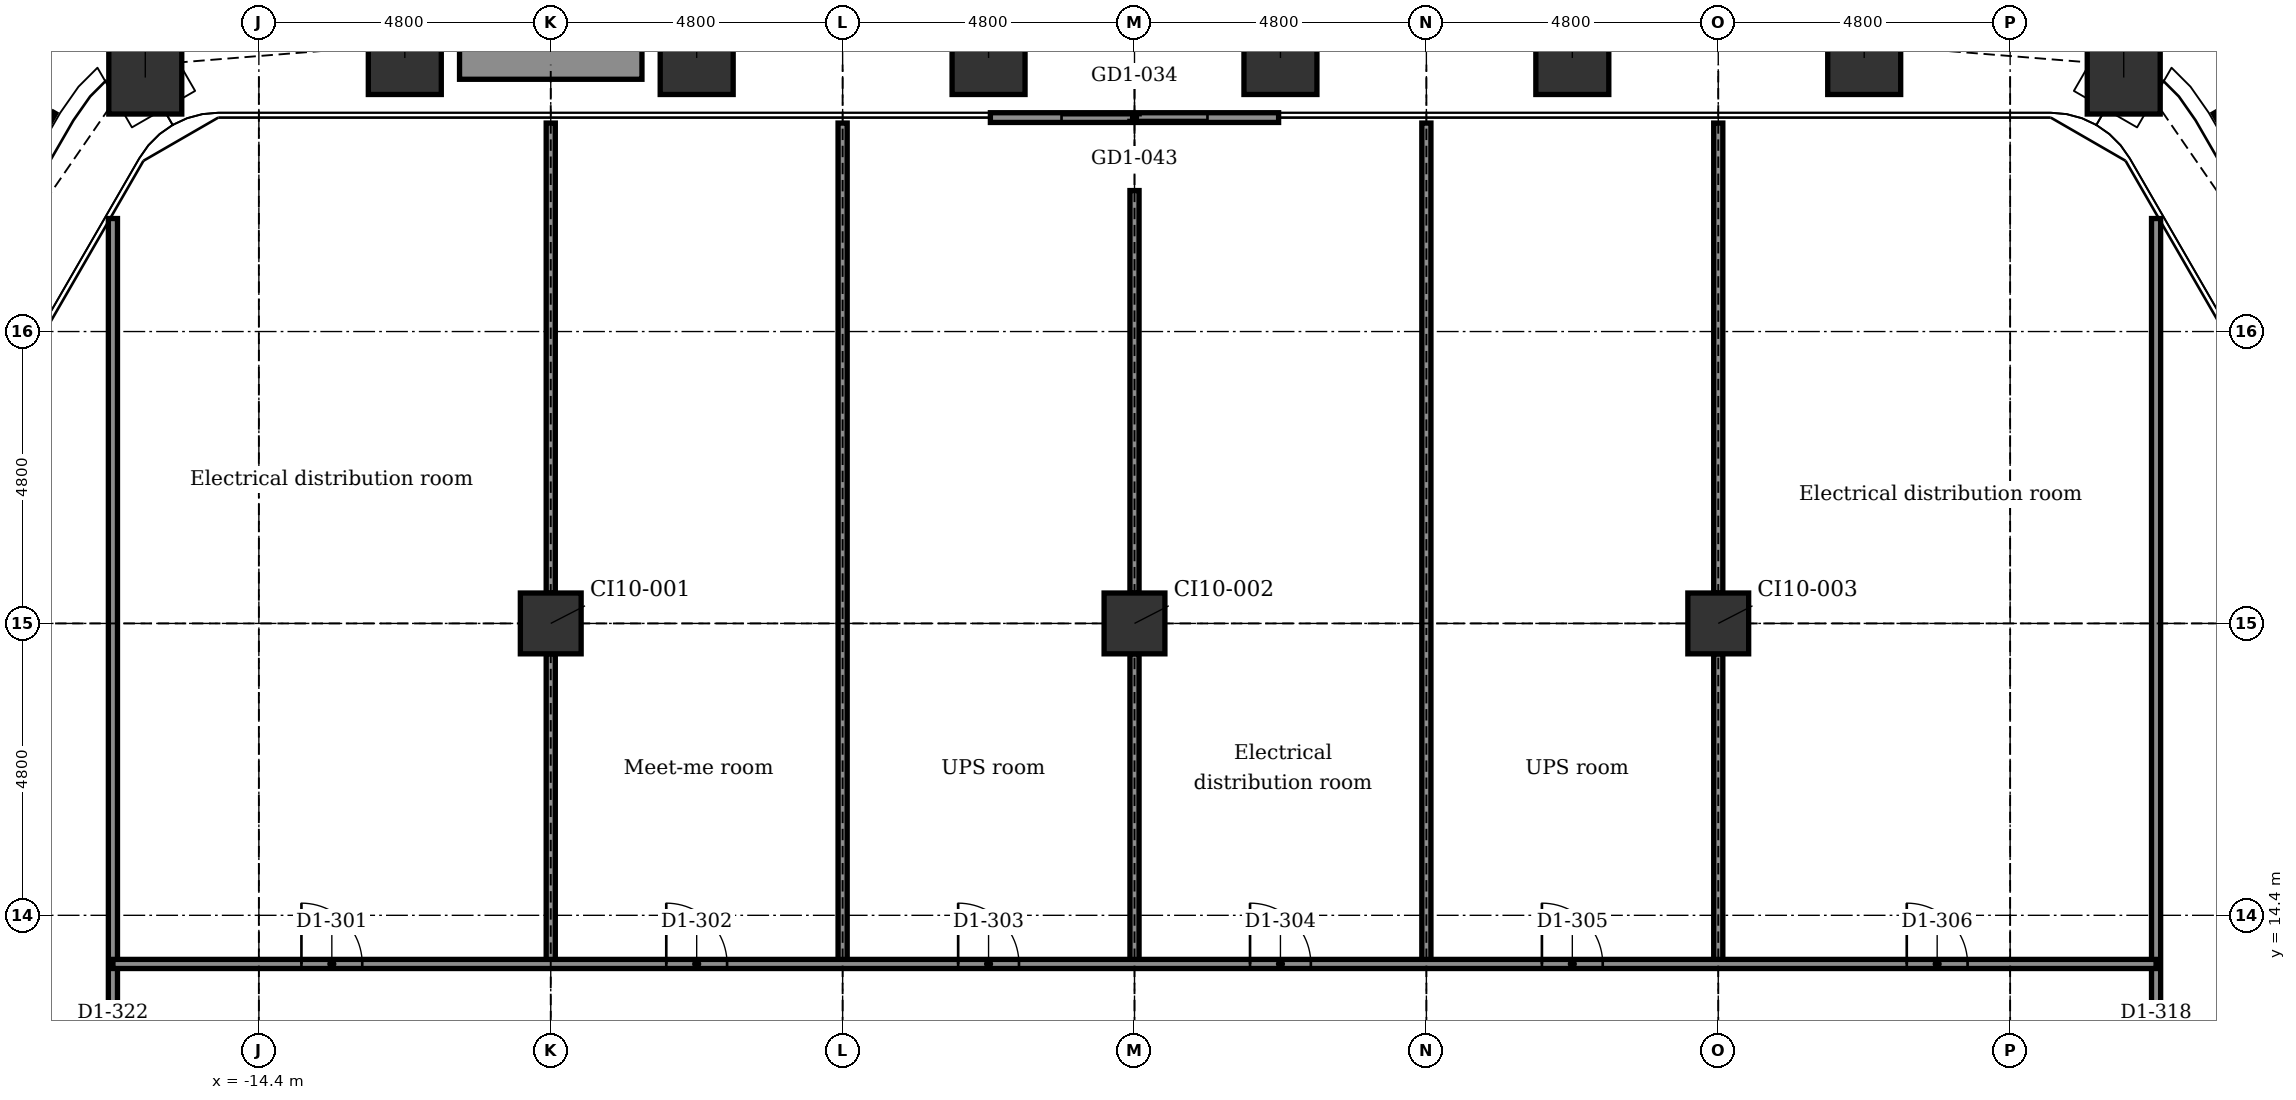
"""IFC4 building model, lengths in metres.
Left out: names, types, materials, properties, quantities, classifications, styles, units other than length and angle.
Written with IfcOpenShell. Run it as: python <this file> out.ifc"""

import sys

from ifc_helpers import new_model, si_unit, direction, frame, frame_2d, origin, origin_2d, place, context, subcontext, project, spatial, rectangle, extrude, element, fill, save


model = new_model("IFC4")
c1 = context("Model", 3, precision=1e-05, world=origin(), true_north=direction((0.0, 1.0)))
c2 = subcontext(c1, "Body", "Model", "MODEL_VIEW")
j1 = project(units=[si_unit("LENGTHUNIT", "METRE"), si_unit("PLANEANGLEUNIT", "RADIAN")], contexts=[c1])
p1 = place(None, origin())
s1 = spatial("IfcSite", under=j1, at=p1, CompositionType="ELEMENT")
p2 = place(p1, origin())
s2 = spatial("IfcBuilding", under=s1, at=p2, CompositionType="ELEMENT")
p3 = place(p2, frame((0.0, 0.0, 113.9)))
s3 = spatial("IfcBuildingStorey", under=s2, at=p3, CompositionType="ELEMENT", Elevation=113.9)
for number, where, z_axis, x_axis in (
    (1, (-16.268, 28.177, -0.2), (0.0, 0.0, 1.0), (0.866, 0.5, 0.0)),
    (2, (-12.0, 28.499, -0.2), (0.0, 0.0, 1.0), (1.0, 0.0, 0.0)),
    (3, (-7.2, 28.499, -0.2), (0.0, 0.0, 1.0), (1.0, 0.0, 0.0)),
    (4, (-2.4, 28.499, -0.2), (0.0, 0.0, 1.0), (1.0, 0.0, 0.0)),
    (5, (2.4, 28.499, -0.2), (0.0, 0.0, 1.0), (1.0, 0.0, 0.0)),
    (6, (7.2, 28.499, -0.2), (0.0, 0.0, 1.0), (1.0, 0.0, 0.0)),
    (7, (12.0, 28.499, -0.2), (0.0, 0.0, 1.0), (1.0, 0.0, 0.0)),
    (8, (16.268, 28.177, -0.2), (0.0, 0.0, 1.0), (0.5, 0.866, 0.0)),
):
    element("IfcColumn", number, at=place(p3, frame(where, z_axis=z_axis, x_axis=x_axis)), inside=s3, PredefinedType="COLUMN", context=c2, shape_type="SweptSolid", body=[
        extrude(rectangle(XDim=1.2, YDim=1.2, at=origin_2d()), origin(), (0.0, 0.0, 1.0), 4.5),
    ])
for number, where, z_axis, x_axis in (
    (9, (-9.6, 19.2, -0.2), (0.0, 0.0, 1.0), (1.0, 0.0, 0.0)),
    (10, (0.0, 19.2, -0.2), (0.0, 0.0, 1.0), (1.0, 0.0, 0.0)),
    (11, (9.6, 19.2, -0.2), (0.0, 0.0, 1.0), (1.0, 0.0, 0.0)),
):
    element("IfcColumn", number, at=place(p3, frame(where, z_axis=z_axis, x_axis=x_axis)), inside=s3, PredefinedType="COLUMN", context=c2, shape_type="SweptSolid", body=[
        extrude(rectangle(XDim=1.0, YDim=1.0, at=origin_2d()), origin(), (0.0, 0.0, 1.0), 4.5),
    ])
p4 = place(p3, frame((-2.37, 27.519, 0.0), z_axis=(0.0, 0.0, 1.0), x_axis=(1.0, 0.0, 0.0)))
e12 = element("IfcWall", 12, at=p4, inside=s3, PredefinedType="PARTITIONING", context=c2, shape_type="SweptSolid", body=[
    extrude(rectangle(XDim=4.74, YDim=0.16, at=frame_2d((2.37, 0.0))), origin(), (0.0, 0.0, 1.0), 4.3),
])
p5 = place(p4, frame((1.17, 0.0, 0.0)))
e13 = element("IfcOpeningElement", 13, at=p5, cuts=e12, PredefinedType="OPENING", context=c2, shape_type="SweptSolid", body=[
    extrude(rectangle(XDim=2.4, YDim=2.4, at=frame_2d((1.2, 1.2))), frame((0.0, 0.09, 0.0), z_axis=(0.0, -1.0, 0.0), x_axis=(1.0, 0.0, 0.0)), (0.0, 0.0, 1.0), 0.18),
])
p6 = place(p3, frame((-11.1, 28.448, 0.0), z_axis=(0.0, 0.0, 1.0), x_axis=(1.0, 0.0, 0.0)))
e14 = element("IfcWall", 14, at=p6, inside=s3, PredefinedType="USERDEFINED", context=c2, shape_type="SweptSolid", body=[
    extrude(rectangle(XDim=3.0, YDim=0.6, at=frame_2d((1.5, 0.0))), origin(), (0.0, 0.0, 1.0), 0.7),
])
p7 = place(p3, frame((16.8, 3.95, 0.0), z_axis=(0.0, 0.0, 1.0), x_axis=(0.0, 1.0, 0.0)))
e15 = element("IfcWall", 15, at=p7, inside=s3, PredefinedType="PARTITIONING", context=c2, shape_type="SweptSolid", body=[
    extrude(rectangle(XDim=21.908, YDim=0.15, at=frame_2d((10.954, 0.0))), origin(), (0.0, 0.0, 1.0), 4.3),
])
p8 = place(p7, frame((0.95, 0.0, 0.0)))
e16 = element("IfcOpeningElement", 16, at=p8, cuts=e15, PredefinedType="OPENING", context=c2, shape_type="SweptSolid", body=[
    extrude(rectangle(XDim=1.0, YDim=2.1, at=frame_2d((0.5, 1.05))), frame((0.0, 0.085, 0.0), z_axis=(0.0, -1.0, 0.0), x_axis=(1.0, 0.0, 0.0)), (0.0, 0.0, 1.0), 0.17),
])
p9 = place(p7, frame((3.675, 0.0, 0.0)))
e17 = element("IfcOpeningElement", 17, at=p9, cuts=e15, PredefinedType="OPENING", context=c2, shape_type="SweptSolid", body=[
    extrude(rectangle(XDim=1.0, YDim=2.1, at=frame_2d((0.5, 1.05))), frame((0.0, 0.085, 0.0), z_axis=(0.0, -1.0, 0.0), x_axis=(1.0, 0.0, 0.0)), (0.0, 0.0, 1.0), 0.17),
])
p10 = place(p7, frame((7.35, 0.0, 0.0)))
e18 = element("IfcOpeningElement", 18, at=p10, cuts=e15, PredefinedType="OPENING", context=c2, shape_type="SweptSolid", body=[
    extrude(rectangle(XDim=1.0, YDim=2.1, at=frame_2d((0.5, 1.05))), frame((0.0, 0.085, 0.0), z_axis=(0.0, -1.0, 0.0), x_axis=(1.0, 0.0, 0.0)), (0.0, 0.0, 1.0), 0.17),
])
p11 = place(p3, frame((9.6, 13.6, 0.0), z_axis=(0.0, 0.0, 1.0), x_axis=(0.0, 1.0, 0.0)))
e19 = element("IfcWall", 19, at=p11, inside=s3, PredefinedType="PARTITIONING", context=c2, shape_type="SweptSolid", body=[
    extrude(rectangle(XDim=5.1, YDim=0.15, at=frame_2d((2.55, 0.0))), origin(), (0.0, 0.0, 1.0), 3.843),
])
p12 = place(p3, frame((9.6, 19.7, 0.0), z_axis=(0.0, 0.0, 1.0), x_axis=(0.0, 1.0, 0.0)))
e20 = element("IfcWall", 20, at=p12, inside=s3, PredefinedType="PARTITIONING", context=c2, shape_type="SweptSolid", body=[
    extrude(rectangle(XDim=7.729, YDim=0.15, at=frame_2d((3.864, 0.0))), origin(), (0.0, 0.0, 1.0), 3.843),
])
p13 = place(p3, frame((4.8, 13.6, 0.0), z_axis=(0.0, 0.0, 1.0), x_axis=(0.0, 1.0, 0.0)))
e21 = element("IfcWall", 21, at=p13, inside=s3, PredefinedType="PARTITIONING", context=c2, shape_type="SweptSolid", body=[
    extrude(rectangle(XDim=13.828, YDim=0.15, at=frame_2d((6.914, 0.0))), origin(), (0.0, 0.0, 1.0), 3.843),
])
p14 = place(p3, frame((0.0, 13.6, 0.0), z_axis=(0.0, 0.0, 1.0), x_axis=(0.0, 1.0, 0.0)))
e22 = element("IfcWall", 22, at=p14, inside=s3, PredefinedType="PARTITIONING", context=c2, shape_type="SweptSolid", body=[
    extrude(rectangle(XDim=5.1, YDim=0.15, at=frame_2d((2.55, 0.0))), origin(), (0.0, 0.0, 1.0), 3.843),
])
p15 = place(p3, frame((0.0, 19.7, 0.0), z_axis=(0.0, 0.0, 1.0), x_axis=(0.0, 1.0, 0.0)))
e23 = element("IfcWall", 23, at=p15, inside=s3, PredefinedType="PARTITIONING", context=c2, shape_type="SweptSolid", body=[
    extrude(rectangle(XDim=6.619, YDim=0.15, at=frame_2d((3.309, 0.0))), origin(), (0.0, 0.0, 1.0), 3.843),
])
p16 = place(p3, frame((-4.8, 13.6, 0.0), z_axis=(0.0, 0.0, 1.0), x_axis=(0.0, 1.0, 0.0)))
e24 = element("IfcWall", 24, at=p16, inside=s3, PredefinedType="PARTITIONING", context=c2, shape_type="SweptSolid", body=[
    extrude(rectangle(XDim=13.828, YDim=0.15, at=frame_2d((6.914, 0.0))), origin(), (0.0, 0.0, 1.0), 3.843),
])
p17 = place(p3, frame((-9.6, 13.6, 0.0), z_axis=(0.0, 0.0, 1.0), x_axis=(0.0, 1.0, 0.0)))
e25 = element("IfcWall", 25, at=p17, inside=s3, PredefinedType="PARTITIONING", context=c2, shape_type="SweptSolid", body=[
    extrude(rectangle(XDim=5.1, YDim=0.15, at=frame_2d((2.55, 0.0))), origin(), (0.0, 0.0, 1.0), 3.843),
])
p18 = place(p3, frame((-9.6, 19.7, 0.0), z_axis=(0.0, 0.0, 1.0), x_axis=(0.0, 1.0, 0.0)))
e26 = element("IfcWall", 26, at=p18, inside=s3, PredefinedType="PARTITIONING", context=c2, shape_type="SweptSolid", body=[
    extrude(rectangle(XDim=7.729, YDim=0.15, at=frame_2d((3.864, 0.0))), origin(), (0.0, 0.0, 1.0), 3.843),
])
p19 = place(p3, frame((-16.8, 3.95, 0.0), z_axis=(0.0, 0.0, 1.0), x_axis=(0.0, 1.0, 0.0)))
e27 = element("IfcWall", 27, at=p19, inside=s3, PredefinedType="PARTITIONING", context=c2, shape_type="SweptSolid", body=[
    extrude(rectangle(XDim=21.908, YDim=0.15, at=frame_2d((10.954, 0.0))), origin(), (0.0, 0.0, 1.0), 4.3),
])
p20 = place(p19, frame((1.25, 0.0, 0.0)))
e28 = element("IfcOpeningElement", 28, at=p20, cuts=e27, PredefinedType="OPENING", context=c2, shape_type="SweptSolid", body=[
    extrude(rectangle(XDim=1.0, YDim=2.1, at=frame_2d((0.5, 1.05))), frame((0.0, 0.085, 0.0), z_axis=(0.0, -1.0, 0.0), x_axis=(1.0, 0.0, 0.0)), (0.0, 0.0, 1.0), 0.17),
])
p21 = place(p19, frame((4.15, 0.0, 0.0)))
e29 = element("IfcOpeningElement", 29, at=p21, cuts=e27, PredefinedType="OPENING", context=c2, shape_type="SweptSolid", body=[
    extrude(rectangle(XDim=1.0, YDim=2.1, at=frame_2d((0.5, 1.05))), frame((0.0, 0.085, 0.0), z_axis=(0.0, -1.0, 0.0), x_axis=(1.0, 0.0, 0.0)), (0.0, 0.0, 1.0), 0.17),
])
p22 = place(p19, frame((7.35, 0.0, 0.0)))
e30 = element("IfcOpeningElement", 30, at=p22, cuts=e27, PredefinedType="OPENING", context=c2, shape_type="SweptSolid", body=[
    extrude(rectangle(XDim=1.0, YDim=2.1, at=frame_2d((0.5, 1.05))), frame((0.0, 0.085, 0.0), z_axis=(0.0, -1.0, 0.0), x_axis=(1.0, 0.0, 0.0)), (0.0, 0.0, 1.0), 0.17),
])
p23 = place(p3, frame((-16.8, 13.6, 0.0), z_axis=(0.0, 0.0, 1.0), x_axis=(1.0, 0.0, 0.0)))
e31 = element("IfcWall", 31, at=p23, inside=s3, PredefinedType="PARTITIONING", context=c2, shape_type="SweptSolid", body=[
    extrude(rectangle(XDim=33.6, YDim=0.15, at=frame_2d((16.8, 0.0))), origin(), (0.0, 0.0, 1.0), 4.3),
])
p24 = place(p23, frame((3.1, 0.0, 0.0)))
e32 = element("IfcOpeningElement", 32, at=p24, cuts=e31, PredefinedType="OPENING", context=c2, shape_type="SweptSolid", body=[
    extrude(rectangle(XDim=1.0, YDim=2.1, at=frame_2d((0.5, 1.05))), frame((0.0, 0.085, 0.0), z_axis=(0.0, -1.0, 0.0), x_axis=(1.0, 0.0, 0.0)), (0.0, 0.0, 1.0), 0.17),
])
p25 = place(p23, frame((9.1, 0.0, 0.0)))
e33 = element("IfcOpeningElement", 33, at=p25, cuts=e31, PredefinedType="OPENING", context=c2, shape_type="SweptSolid", body=[
    extrude(rectangle(XDim=1.0, YDim=2.1, at=frame_2d((0.5, 1.05))), frame((0.0, 0.085, 0.0), z_axis=(0.0, -1.0, 0.0), x_axis=(1.0, 0.0, 0.0)), (0.0, 0.0, 1.0), 0.17),
])
p26 = place(p23, frame((13.9, 0.0, 0.0)))
e34 = element("IfcOpeningElement", 34, at=p26, cuts=e31, PredefinedType="OPENING", context=c2, shape_type="SweptSolid", body=[
    extrude(rectangle(XDim=1.0, YDim=2.1, at=frame_2d((0.5, 1.05))), frame((0.0, 0.085, 0.0), z_axis=(0.0, -1.0, 0.0), x_axis=(1.0, 0.0, 0.0)), (0.0, 0.0, 1.0), 0.17),
])
p27 = place(p23, frame((18.7, 0.0, 0.0)))
e35 = element("IfcOpeningElement", 35, at=p27, cuts=e31, PredefinedType="OPENING", context=c2, shape_type="SweptSolid", body=[
    extrude(rectangle(XDim=1.0, YDim=2.1, at=frame_2d((0.5, 1.05))), frame((0.0, 0.085, 0.0), z_axis=(0.0, -1.0, 0.0), x_axis=(1.0, 0.0, 0.0)), (0.0, 0.0, 1.0), 0.17),
])
p28 = place(p23, frame((23.5, 0.0, 0.0)))
e36 = element("IfcOpeningElement", 36, at=p28, cuts=e31, PredefinedType="OPENING", context=c2, shape_type="SweptSolid", body=[
    extrude(rectangle(XDim=1.0, YDim=2.1, at=frame_2d((0.5, 1.05))), frame((0.0, 0.085, 0.0), z_axis=(0.0, -1.0, 0.0), x_axis=(1.0, 0.0, 0.0)), (0.0, 0.0, 1.0), 0.17),
])
p29 = place(p23, frame((29.5, 0.0, 0.0)))
e37 = element("IfcOpeningElement", 37, at=p29, cuts=e31, PredefinedType="OPENING", context=c2, shape_type="SweptSolid", body=[
    extrude(rectangle(XDim=1.0, YDim=2.1, at=frame_2d((0.5, 1.05))), frame((0.0, 0.085, 0.0), z_axis=(0.0, -1.0, 0.0), x_axis=(1.0, 0.0, 0.0)), (0.0, 0.0, 1.0), 0.17),
])
p30 = place(p5, origin())
e38 = element("IfcDoor", 38, at=p30, inside=s3, OperationType="DOUBLE_DOOR_SLIDING", PredefinedType="DOOR", context=c2, shape_type="SweptSolid", body=[
    extrude(rectangle(XDim=2.4, YDim=2.4, at=frame_2d((1.2, 1.2))), frame((0.0, 0.025, 0.0), z_axis=(0.0, -1.0, 0.0), x_axis=(1.0, 0.0, 0.0)), (0.0, 0.0, 1.0), 0.05),
])
fill(e13, e38)
p31 = place(p24, origin())
e39 = element("IfcDoor", 39, at=p31, inside=s3, OperationType="SINGLE_SWING_LEFT", PredefinedType="DOOR", context=c2, shape_type="SweptSolid", body=[
    extrude(rectangle(XDim=1.0, YDim=2.1, at=frame_2d((0.5, 1.05))), frame((0.0, 0.025, 0.0), z_axis=(0.0, -1.0, 0.0), x_axis=(1.0, 0.0, 0.0)), (0.0, 0.0, 1.0), 0.05),
])
fill(e32, e39)
p32 = place(p25, origin())
e40 = element("IfcDoor", 40, at=p32, inside=s3, OperationType="SINGLE_SWING_LEFT", PredefinedType="DOOR", context=c2, shape_type="SweptSolid", body=[
    extrude(rectangle(XDim=1.0, YDim=2.1, at=frame_2d((0.5, 1.05))), frame((0.0, 0.025, 0.0), z_axis=(0.0, -1.0, 0.0), x_axis=(1.0, 0.0, 0.0)), (0.0, 0.0, 1.0), 0.05),
])
fill(e33, e40)
p33 = place(p26, origin())
e41 = element("IfcDoor", 41, at=p33, inside=s3, OperationType="SINGLE_SWING_LEFT", PredefinedType="DOOR", context=c2, shape_type="SweptSolid", body=[
    extrude(rectangle(XDim=1.0, YDim=2.1, at=frame_2d((0.5, 1.05))), frame((0.0, 0.025, 0.0), z_axis=(0.0, -1.0, 0.0), x_axis=(1.0, 0.0, 0.0)), (0.0, 0.0, 1.0), 0.05),
])
fill(e34, e41)
p34 = place(p27, origin())
e42 = element("IfcDoor", 42, at=p34, inside=s3, OperationType="SINGLE_SWING_LEFT", PredefinedType="DOOR", context=c2, shape_type="SweptSolid", body=[
    extrude(rectangle(XDim=1.0, YDim=2.1, at=frame_2d((0.5, 1.05))), frame((0.0, 0.025, 0.0), z_axis=(0.0, -1.0, 0.0), x_axis=(1.0, 0.0, 0.0)), (0.0, 0.0, 1.0), 0.05),
])
fill(e35, e42)
p35 = place(p28, origin())
e43 = element("IfcDoor", 43, at=p35, inside=s3, OperationType="SINGLE_SWING_LEFT", PredefinedType="DOOR", context=c2, shape_type="SweptSolid", body=[
    extrude(rectangle(XDim=1.0, YDim=2.1, at=frame_2d((0.5, 1.05))), frame((0.0, 0.025, 0.0), z_axis=(0.0, -1.0, 0.0), x_axis=(1.0, 0.0, 0.0)), (0.0, 0.0, 1.0), 0.05),
])
fill(e36, e43)
p36 = place(p29, origin())
e44 = element("IfcDoor", 44, at=p36, inside=s3, OperationType="SINGLE_SWING_LEFT", PredefinedType="DOOR", context=c2, shape_type="SweptSolid", body=[
    extrude(rectangle(XDim=1.0, YDim=2.1, at=frame_2d((0.5, 1.05))), frame((0.0, 0.025, 0.0), z_axis=(0.0, -1.0, 0.0), x_axis=(1.0, 0.0, 0.0)), (0.0, 0.0, 1.0), 0.05),
])
fill(e37, e44)
save(model, sys.argv[1])
